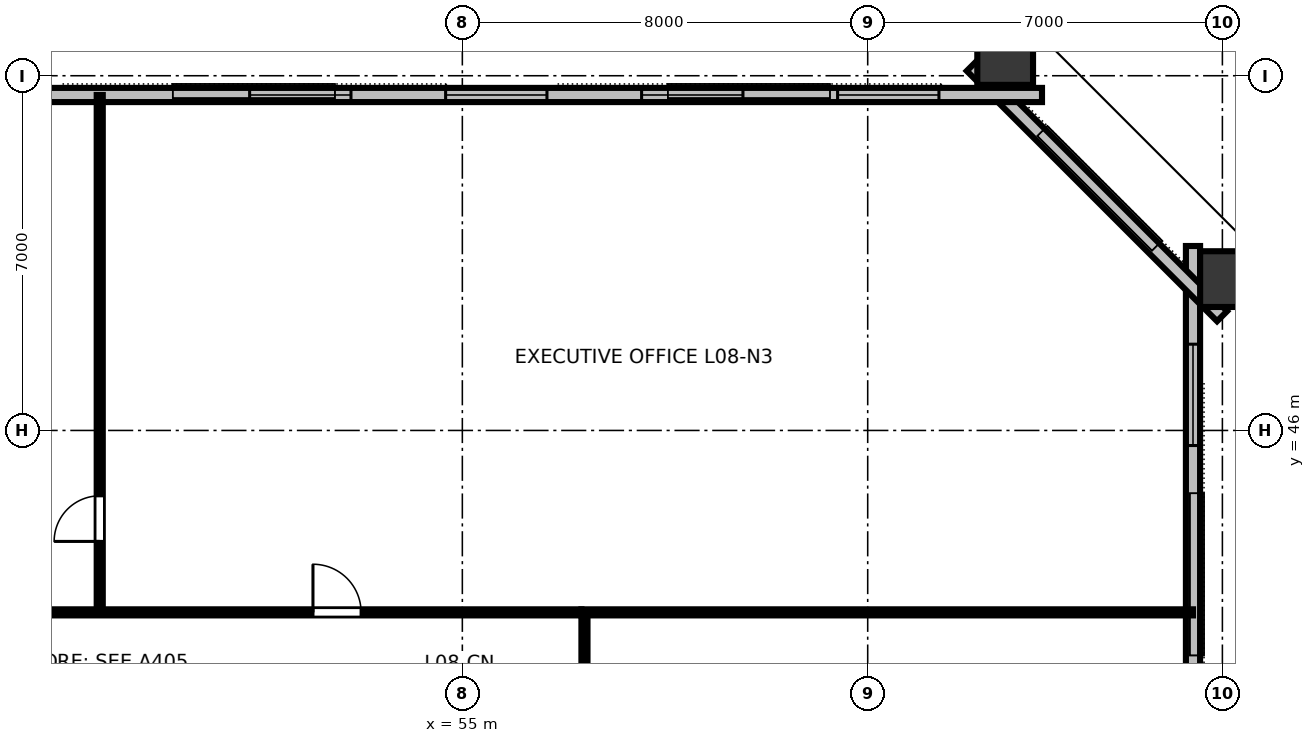
"""IFC4 building model, lengths in metres.
Left out: names, types, materials, properties, quantities, classifications, styles, units other than length and angle.
Written with IfcOpenShell. Run it as: python <this file> out.ifc"""

import sys

from ifc_helpers import new_model, si_unit, direction, frame, frame_2d, origin, origin_2d, place, context, subcontext, project, spatial, rectangle, hollow_rectangle, extrude, element, fill, save


model = new_model("IFC4")
c1 = context("Model", 3, precision=1e-05, world=origin(), true_north=direction((0.0, 1.0)))
c2 = subcontext(c1, "Body", "Model", "MODEL_VIEW")
j1 = project(units=[si_unit("LENGTHUNIT", "METRE"), si_unit("PLANEANGLEUNIT", "RADIAN")], contexts=[c1])
p1 = place(None, origin())
s1 = spatial("IfcSite", under=j1, at=p1, CompositionType="ELEMENT")
p2 = place(p1, origin())
s2 = spatial("IfcBuilding", under=s1, at=p2, CompositionType="ELEMENT")
p3 = place(p2, frame((0.0, 0.0, 35.2)))
s3 = spatial("IfcBuildingStorey", under=s2, at=p3, CompositionType="ELEMENT", Elevation=35.2)
p4 = place(p3, frame((70.211, 48.987, 0.0), z_axis=(0.10994269781, 0.032281703141, 0.993413556803), x_axis=(-0.953174231432, -0.279873863329, 0.114584052814)))
e1 = element("IfcColumn", 1, at=p4, inside=s3, PredefinedType="COLUMN", context=c2, shape_type="SweptSolid", body=[
    extrude(hollow_rectangle(XDim=1.1, YDim=1.3, WallThickness=0.07, at=origin_2d()), origin(), (0.0, 0.0, 1.0), 3.169),
])
p5 = place(p3, frame((65.713, 53.469, 0.0), z_axis=(0.047968316961, 0.09439424431, 0.994378583442), x_axis=(-0.891494829719, 0.453030869351, 0.0)))
e2 = element("IfcColumn", 2, at=p5, inside=s3, PredefinedType="COLUMN", context=c2, shape_type="SweptSolid", body=[
    extrude(hollow_rectangle(XDim=1.1, YDim=1.3, WallThickness=0.07, at=origin_2d()), origin(), (0.0, 0.0, 1.0), 3.166),
])
p6 = place(p3, frame((69.42, 14.36, 0.0), z_axis=(0.0, 0.0, 1.0), x_axis=(0.0, 1.0, 0.0)))
e3 = element("IfcWall", 3, at=p6, inside=s3, PredefinedType="STANDARD", context=c2, shape_type="SweptSolid", body=[
    extrude(rectangle(XDim=35.28, YDim=0.28, at=frame_2d((17.64, 0.0))), origin(), (0.0, 0.0, 1.0), 3.15),
])
p7 = place(p6, frame((1.938, 0.0, 0.8)))
e4 = element("IfcOpeningElement", 4, at=p7, cuts=e3, PredefinedType="OPENING", context=c2, shape_type="SweptSolid", body=[
    extrude(rectangle(XDim=2.0, YDim=1.95, at=frame_2d((1.0, 0.975))), frame((0.0, 0.15, 0.0), z_axis=(0.0, -1.0, 0.0), x_axis=(1.0, 0.0, 0.0)), (0.0, 0.0, 1.0), 0.3),
])
p8 = place(p6, frame((9.289, 0.0, 0.8)))
e5 = element("IfcOpeningElement", 5, at=p8, cuts=e3, PredefinedType="OPENING", context=c2, shape_type="SweptSolid", body=[
    extrude(rectangle(XDim=2.0, YDim=1.95, at=frame_2d((1.0, 0.975))), frame((0.0, 0.15, 0.0), z_axis=(0.0, -1.0, 0.0), x_axis=(1.0, 0.0, 0.0)), (0.0, 0.0, 1.0), 0.3),
])
p9 = place(p6, frame((12.964, 0.0, 0.8)))
e6 = element("IfcOpeningElement", 6, at=p9, cuts=e3, PredefinedType="OPENING", context=c2, shape_type="SweptSolid", body=[
    extrude(rectangle(XDim=2.0, YDim=1.95, at=frame_2d((1.0, 0.975))), frame((0.0, 0.15, 0.0), z_axis=(0.0, -1.0, 0.0), x_axis=(1.0, 0.0, 0.0)), (0.0, 0.0, 1.0), 0.3),
])
p10 = place(p6, frame((20.316, 0.0, 0.8)))
e7 = element("IfcOpeningElement", 7, at=p10, cuts=e3, PredefinedType="OPENING", context=c2, shape_type="SweptSolid", body=[
    extrude(rectangle(XDim=2.0, YDim=1.95, at=frame_2d((1.0, 0.975))), frame((0.0, 0.15, 0.0), z_axis=(0.0, -1.0, 0.0), x_axis=(1.0, 0.0, 0.0)), (0.0, 0.0, 1.0), 0.3),
])
p11 = place(p6, frame((23.991, 0.0, 0.8)))
e8 = element("IfcOpeningElement", 8, at=p11, cuts=e3, PredefinedType="OPENING", context=c2, shape_type="SweptSolid", body=[
    extrude(rectangle(XDim=2.0, YDim=1.95, at=frame_2d((1.0, 0.975))), frame((0.0, 0.15, 0.0), z_axis=(0.0, -1.0, 0.0), x_axis=(1.0, 0.0, 0.0)), (0.0, 0.0, 1.0), 0.3),
])
p12 = place(p6, frame((31.342, 0.0, 0.8)))
e9 = element("IfcOpeningElement", 9, at=p12, cuts=e3, PredefinedType="OPENING", context=c2, shape_type="SweptSolid", body=[
    extrude(rectangle(XDim=2.0, YDim=1.95, at=frame_2d((1.0, 0.975))), frame((0.0, 0.15, 0.0), z_axis=(0.0, -1.0, 0.0), x_axis=(1.0, 0.0, 0.0)), (0.0, 0.0, 1.0), 0.3),
])
p13 = place(p3, frame((69.994, 48.254, 0.0), z_axis=(0.0, 0.0, 1.0), x_axis=(-0.707106781187, 0.707106781187, 0.0)))
e10 = element("IfcWall", 10, at=p13, inside=s3, PredefinedType="STANDARD", context=c2, shape_type="SweptSolid", body=[
    extrude(rectangle(XDim=6.985, YDim=0.28, at=frame_2d((3.493, 0.0))), origin(), (0.0, 0.0, 1.0), 3.15),
])
p14 = place(p3, frame((66.44, 52.62, 0.0), z_axis=(0.0, 0.0, 1.0), x_axis=(-1.0, 0.0, 0.0)))
e11 = element("IfcWall", 11, at=p14, inside=s3, PredefinedType="STANDARD", context=c2, shape_type="SweptSolid", body=[
    extrude(rectangle(XDim=40.88, YDim=0.28, at=frame_2d((20.44, 0.0))), origin(), (0.0, 0.0, 1.0), 3.15),
])
p15 = place(p14, frame((2.034, 0.0, 0.8)))
e12 = element("IfcOpeningElement", 12, at=p15, cuts=e11, PredefinedType="OPENING", context=c2, shape_type="SweptSolid", body=[
    extrude(rectangle(XDim=2.0, YDim=1.95, at=frame_2d((1.0, 0.975))), frame((0.0, 0.15, 0.0), z_axis=(0.0, -1.0, 0.0), x_axis=(1.0, 0.0, 0.0)), (0.0, 0.0, 1.0), 0.3),
])
p16 = place(p14, frame((5.902, 0.0, 0.8)))
e13 = element("IfcOpeningElement", 13, at=p16, cuts=e11, PredefinedType="OPENING", context=c2, shape_type="SweptSolid", body=[
    extrude(rectangle(XDim=2.0, YDim=1.95, at=frame_2d((1.0, 0.975))), frame((0.0, 0.15, 0.0), z_axis=(0.0, -1.0, 0.0), x_axis=(1.0, 0.0, 0.0)), (0.0, 0.0, 1.0), 0.3),
])
p17 = place(p14, frame((9.77, 0.0, 0.8)))
e14 = element("IfcOpeningElement", 14, at=p17, cuts=e11, PredefinedType="OPENING", context=c2, shape_type="SweptSolid", body=[
    extrude(rectangle(XDim=2.0, YDim=1.95, at=frame_2d((1.0, 0.975))), frame((0.0, 0.15, 0.0), z_axis=(0.0, -1.0, 0.0), x_axis=(1.0, 0.0, 0.0)), (0.0, 0.0, 1.0), 0.3),
])
p18 = place(p14, frame((13.638, 0.0, 0.8)))
e15 = element("IfcOpeningElement", 15, at=p18, cuts=e11, PredefinedType="OPENING", context=c2, shape_type="SweptSolid", body=[
    extrude(rectangle(XDim=2.0, YDim=1.95, at=frame_2d((1.0, 0.975))), frame((0.0, 0.15, 0.0), z_axis=(0.0, -1.0, 0.0), x_axis=(1.0, 0.0, 0.0)), (0.0, 0.0, 1.0), 0.3),
])
p19 = place(p14, frame((25.242, 0.0, 0.8)))
e16 = element("IfcOpeningElement", 16, at=p19, cuts=e11, PredefinedType="OPENING", context=c2, shape_type="SweptSolid", body=[
    extrude(rectangle(XDim=2.0, YDim=1.95, at=frame_2d((1.0, 0.975))), frame((0.0, 0.15, 0.0), z_axis=(0.0, -1.0, 0.0), x_axis=(1.0, 0.0, 0.0)), (0.0, 0.0, 1.0), 0.3),
])
p20 = place(p14, frame((29.11, 0.0, 0.8)))
e17 = element("IfcOpeningElement", 17, at=p20, cuts=e11, PredefinedType="OPENING", context=c2, shape_type="SweptSolid", body=[
    extrude(rectangle(XDim=2.0, YDim=1.95, at=frame_2d((1.0, 0.975))), frame((0.0, 0.15, 0.0), z_axis=(0.0, -1.0, 0.0), x_axis=(1.0, 0.0, 0.0)), (0.0, 0.0, 1.0), 0.3),
])
p21 = place(p14, frame((32.978, 0.0, 0.8)))
e18 = element("IfcOpeningElement", 18, at=p21, cuts=e11, PredefinedType="OPENING", context=c2, shape_type="SweptSolid", body=[
    extrude(rectangle(XDim=2.0, YDim=1.95, at=frame_2d((1.0, 0.975))), frame((0.0, 0.15, 0.0), z_axis=(0.0, -1.0, 0.0), x_axis=(1.0, 0.0, 0.0)), (0.0, 0.0, 1.0), 0.3),
])
p22 = place(p14, frame((36.846, 0.0, 0.8)))
e19 = element("IfcOpeningElement", 19, at=p22, cuts=e11, PredefinedType="OPENING", context=c2, shape_type="SweptSolid", body=[
    extrude(rectangle(XDim=2.0, YDim=1.95, at=frame_2d((1.0, 0.975))), frame((0.0, 0.15, 0.0), z_axis=(0.0, -1.0, 0.0), x_axis=(1.0, 0.0, 0.0)), (0.0, 0.0, 1.0), 0.3),
])
p23 = place(p3, frame((47.844, 42.41, 0.0), z_axis=(0.0, 0.0, 1.0), x_axis=(0.0, 1.0, 0.0)))
e20 = element("IfcWall", 20, at=p23, inside=s3, PredefinedType="PARTITIONING", context=c2, shape_type="SweptSolid", body=[
    extrude(rectangle(XDim=10.21, YDim=0.12, at=frame_2d((5.105, 0.0))), origin(), (0.0, 0.0, 1.0), 2.43),
])
p24 = place(p23, frame((1.4, 0.0, 0.0)))
e21 = element("IfcOpeningElement", 21, at=p24, cuts=e20, PredefinedType="OPENING", context=c2, shape_type="SweptSolid", body=[
    extrude(rectangle(XDim=0.9, YDim=2.15, at=frame_2d((0.45, 1.075))), frame((0.0, 0.07, 0.0), z_axis=(0.0, -1.0, 0.0), x_axis=(1.0, 0.0, 0.0)), (0.0, 0.0, 1.0), 0.14),
])
p25 = place(p3, frame((34.65, 42.41, 0.0), z_axis=(0.0, 0.0, 1.0), x_axis=(1.0, 0.0, 0.0)))
e22 = element("IfcWall", 22, at=p25, inside=s3, PredefinedType="PARTITIONING", context=c2, shape_type="SweptSolid", body=[
    extrude(rectangle(XDim=22.7, YDim=0.12, at=frame_2d((11.35, 0.0))), origin(), (0.0, 0.0, 1.0), 2.43),
])
p26 = place(p25, frame((3.981, 0.0, 0.0)))
e23 = element("IfcOpeningElement", 23, at=p26, cuts=e22, PredefinedType="OPENING", context=c2, shape_type="SweptSolid", body=[
    extrude(rectangle(XDim=0.95, YDim=2.15, at=frame_2d((0.475, 1.075))), frame((0.0, 0.07, 0.0), z_axis=(0.0, -1.0, 0.0), x_axis=(1.0, 0.0, 0.0)), (0.0, 0.0, 1.0), 0.14),
])
p27 = place(p25, frame((10.508, 0.0, 0.0)))
e24 = element("IfcOpeningElement", 24, at=p27, cuts=e22, PredefinedType="OPENING", context=c2, shape_type="SweptSolid", body=[
    extrude(rectangle(XDim=0.95, YDim=2.15, at=frame_2d((0.475, 1.075))), frame((0.0, 0.07, 0.0), z_axis=(0.0, -1.0, 0.0), x_axis=(1.0, 0.0, 0.0)), (0.0, 0.0, 1.0), 0.14),
])
p28 = place(p25, frame((17.402, 0.0, 0.0)))
e25 = element("IfcOpeningElement", 25, at=p28, cuts=e22, PredefinedType="OPENING", context=c2, shape_type="SweptSolid", body=[
    extrude(rectangle(XDim=0.95, YDim=2.15, at=frame_2d((0.475, 1.075))), frame((0.0, 0.07, 0.0), z_axis=(0.0, -1.0, 0.0), x_axis=(1.0, 0.0, 0.0)), (0.0, 0.0, 1.0), 0.14),
])
p29 = place(p3, frame((57.41, 21.65, 0.0), z_axis=(0.0, 0.0, 1.0), x_axis=(0.0, 1.0, 0.0)))
e26 = element("IfcWall", 26, at=p29, inside=s3, PredefinedType="PARTITIONING", context=c2, shape_type="SweptSolid", body=[
    extrude(rectangle(XDim=20.7, YDim=0.12, at=frame_2d((10.35, 0.0))), origin(), (0.0, 0.0, 1.0), 2.43),
])
p30 = place(p29, frame((5.31, 0.0, 0.0)))
e27 = element("IfcOpeningElement", 27, at=p30, cuts=e26, PredefinedType="OPENING", context=c2, shape_type="SweptSolid", body=[
    extrude(rectangle(XDim=0.95, YDim=2.15, at=frame_2d((0.475, 1.075))), frame((0.0, 0.07, 0.0), z_axis=(0.0, -1.0, 0.0), x_axis=(1.0, 0.0, 0.0)), (0.0, 0.0, 1.0), 0.14),
])
p31 = place(p29, frame((15.459, 0.0, 0.0)))
e28 = element("IfcOpeningElement", 28, at=p31, cuts=e26, PredefinedType="OPENING", context=c2, shape_type="SweptSolid", body=[
    extrude(rectangle(XDim=0.95, YDim=2.15, at=frame_2d((0.475, 1.075))), frame((0.0, 0.07, 0.0), z_axis=(0.0, -1.0, 0.0), x_axis=(1.0, 0.0, 0.0)), (0.0, 0.0, 1.0), 0.14),
])
p32 = place(p3, frame((57.35, 42.41, 0.0), z_axis=(0.0, 0.0, 1.0), x_axis=(1.0, 0.0, 0.0)))
e29 = element("IfcWall", 29, at=p32, inside=s3, PredefinedType="PARTITIONING", context=c2, shape_type="SweptSolid", body=[
    extrude(rectangle(XDim=12.07, YDim=0.12, at=frame_2d((6.035, 0.0))), origin(), (0.0, 0.0, 1.0), 2.43),
])
p33 = place(p12, origin())
e30 = element("IfcWindow", 30, at=p33, inside=s3, PartitioningType="SINGLE_PANEL", PredefinedType="WINDOW", context=c2, shape_type="SweptSolid", body=[
    extrude(rectangle(XDim=2.0, YDim=1.95, at=frame_2d((1.0, 0.975))), frame((0.0, 0.03, 0.0), z_axis=(0.0, -1.0, 0.0), x_axis=(1.0, 0.0, 0.0)), (0.0, 0.0, 1.0), 0.06),
])
fill(e9, e30)
p34 = place(p15, origin())
e31 = element("IfcWindow", 31, at=p34, inside=s3, PartitioningType="SINGLE_PANEL", PredefinedType="WINDOW", context=c2, shape_type="SweptSolid", body=[
    extrude(rectangle(XDim=2.0, YDim=1.95, at=frame_2d((1.0, 0.975))), frame((0.0, 0.03, 0.0), z_axis=(0.0, -1.0, 0.0), x_axis=(1.0, 0.0, 0.0)), (0.0, 0.0, 1.0), 0.06),
])
fill(e12, e31)
p35 = place(p16, origin())
e32 = element("IfcWindow", 32, at=p35, inside=s3, PartitioningType="SINGLE_PANEL", PredefinedType="WINDOW", context=c2, shape_type="SweptSolid", body=[
    extrude(rectangle(XDim=2.0, YDim=1.95, at=frame_2d((1.0, 0.975))), frame((0.0, 0.03, 0.0), z_axis=(0.0, -1.0, 0.0), x_axis=(1.0, 0.0, 0.0)), (0.0, 0.0, 1.0), 0.06),
])
fill(e13, e32)
p36 = place(p17, origin())
e33 = element("IfcWindow", 33, at=p36, inside=s3, PartitioningType="SINGLE_PANEL", PredefinedType="WINDOW", context=c2, shape_type="SweptSolid", body=[
    extrude(rectangle(XDim=2.0, YDim=1.95, at=frame_2d((1.0, 0.975))), frame((0.0, 0.03, 0.0), z_axis=(0.0, -1.0, 0.0), x_axis=(1.0, 0.0, 0.0)), (0.0, 0.0, 1.0), 0.06),
])
fill(e14, e33)
p37 = place(p18, origin())
e34 = element("IfcWindow", 34, at=p37, inside=s3, PartitioningType="SINGLE_PANEL", PredefinedType="WINDOW", context=c2, shape_type="SweptSolid", body=[
    extrude(rectangle(XDim=2.0, YDim=1.95, at=frame_2d((1.0, 0.975))), frame((0.0, 0.03, 0.0), z_axis=(0.0, -1.0, 0.0), x_axis=(1.0, 0.0, 0.0)), (0.0, 0.0, 1.0), 0.06),
])
fill(e15, e34)
p38 = place(p24, origin())
e35 = element("IfcDoor", 35, at=p38, inside=s3, OperationType="SINGLE_SWING_LEFT", PredefinedType="DOOR", context=c2, shape_type="SweptSolid", body=[
    extrude(rectangle(XDim=0.9, YDim=2.15, at=frame_2d((0.45, 1.075))), frame((0.0, 0.025, 0.0), z_axis=(0.0, -1.0, 0.0), x_axis=(1.0, 0.0, 0.0)), (0.0, 0.0, 1.0), 0.05),
])
fill(e21, e35)
p39 = place(p28, origin())
e36 = element("IfcDoor", 36, at=p39, inside=s3, OperationType="SINGLE_SWING_LEFT", PredefinedType="DOOR", context=c2, shape_type="SweptSolid", body=[
    extrude(rectangle(XDim=0.95, YDim=2.15, at=frame_2d((0.475, 1.075))), frame((0.0, 0.025, 0.0), z_axis=(0.0, -1.0, 0.0), x_axis=(1.0, 0.0, 0.0)), (0.0, 0.0, 1.0), 0.05),
])
fill(e25, e36)
save(model, sys.argv[1])
